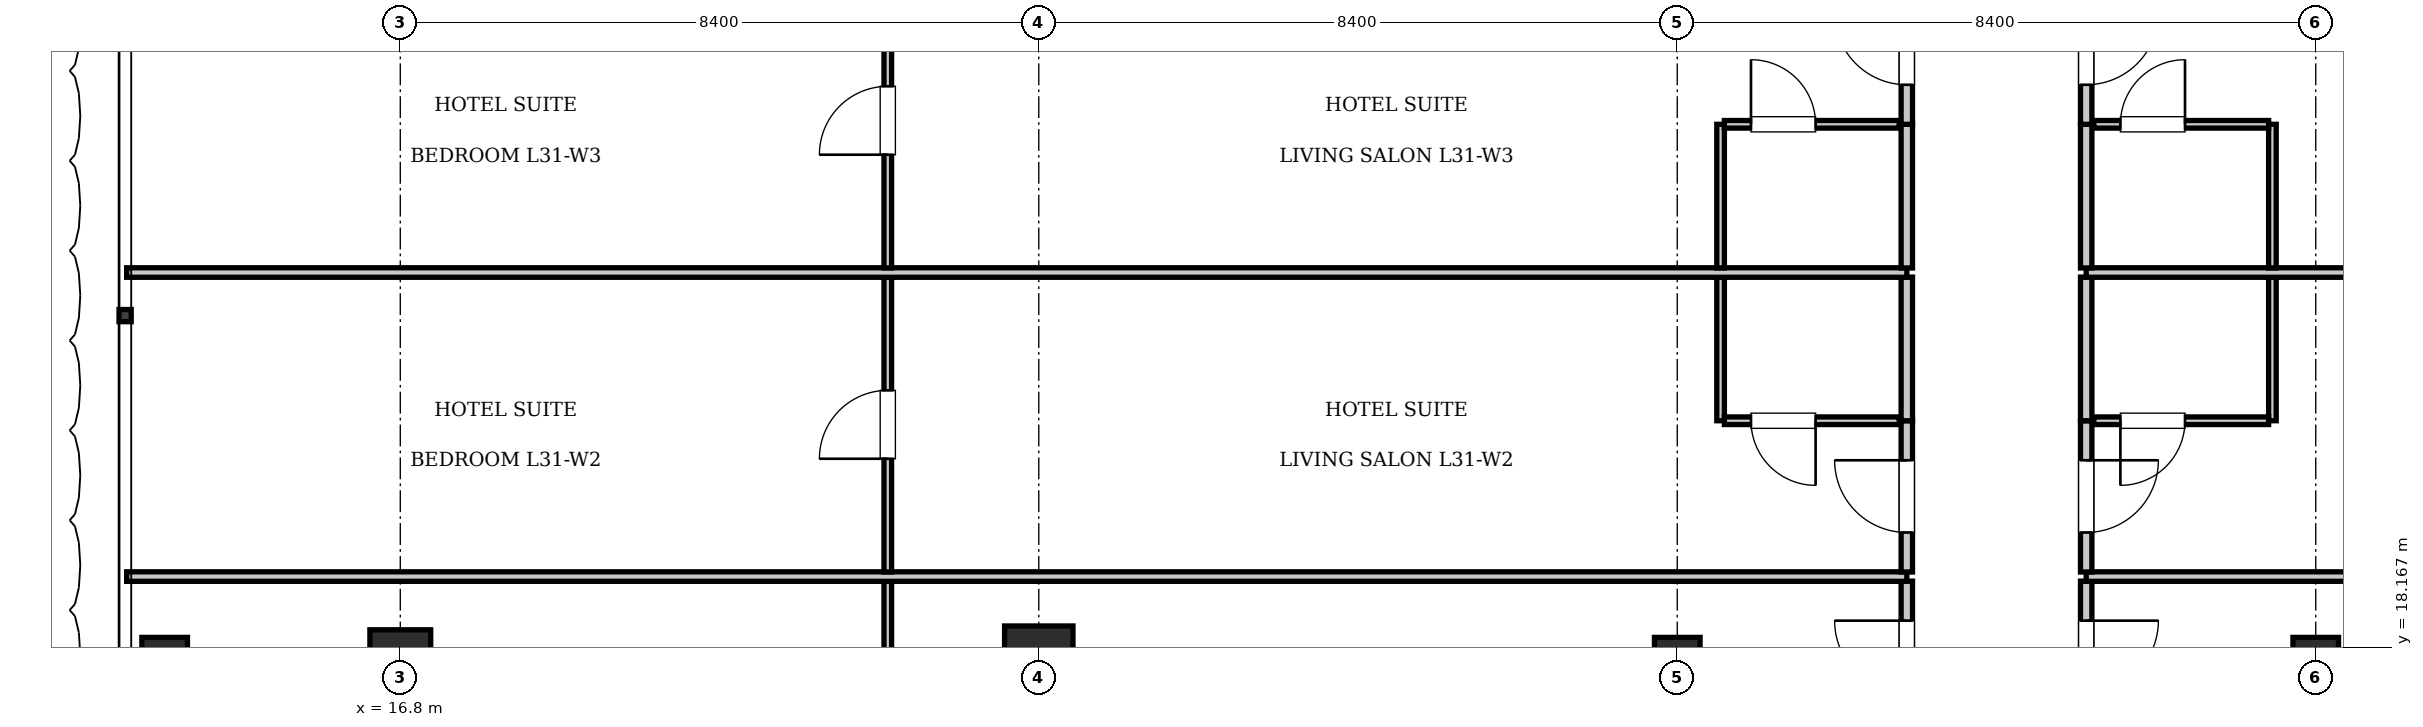
"""IFC4 building model, lengths in metres.
Left out: names, types, materials, properties, quantities, classifications, styles, units other than length and angle.
Written with IfcOpenShell. Run it as: python <this file> out.ifc"""

import sys

from ifc_helpers import new_model, si_unit, direction, frame, frame_2d, origin, origin_2d, place, context, subcontext, project, spatial, rectangle, i_section, extrude, element, fill, save


model = new_model("IFC4")
c1 = context("Model", 3, precision=1e-05, world=origin(), true_north=direction((0.0, 1.0)))
c2 = subcontext(c1, "Body", "Model", "MODEL_VIEW")
j1 = project(units=[si_unit("LENGTHUNIT", "METRE"), si_unit("PLANEANGLEUNIT", "RADIAN")], contexts=[c1])
p1 = place(None, origin())
s1 = spatial("IfcSite", under=j1, at=p1, CompositionType="ELEMENT")
p2 = place(p1, origin())
s2 = spatial("IfcBuilding", under=s1, at=p2, CompositionType="ELEMENT")
p3 = place(p2, frame((0.0, 0.0, 131.25)))
s3 = spatial("IfcBuildingStorey", under=s2, at=p3, CompositionType="ELEMENT", Elevation=131.25)
p4 = place(p3, frame((25.2, 18.0, 0.0), z_axis=(0.0, 0.0, 1.0), x_axis=(1.0, 0.0, 0.0)))
e1 = element("IfcColumn", 1, at=p4, inside=s3, PredefinedType="COLUMN", context=c2, shape_type="SweptSolid", body=[
    extrude(rectangle(XDim=0.9, YDim=0.9, at=origin_2d()), origin(), (0.0, 0.0, 1.0), 3.85),
])
for number, where, z_axis, x_axis in (
    (2, (33.6, 18.0, 0.0), (0.0, 0.0, 1.0), (1.0, 0.0, 0.0)),
    (3, (42.0, 18.0, 0.0), (0.0, 0.0, 1.0), (1.0, 0.0, 0.0)),
):
    element("IfcColumn", number, at=place(p3, frame(where, z_axis=z_axis, x_axis=x_axis)), inside=s3, PredefinedType="COLUMN", context=c2, shape_type="SweptSolid", body=[
        extrude(i_section(OverallWidth=0.6, OverallDepth=0.6, WebThickness=0.025, FlangeThickness=0.038, at=origin_2d()), origin(), (0.0, 0.0, 1.0), 3.85),
    ])
p5 = place(p3, frame((16.8, 18.0, 0.0), z_axis=(0.0, 0.0, 1.0), x_axis=(1.0, 0.0, 0.0)))
e4 = element("IfcColumn", 4, at=p5, inside=s3, PredefinedType="COLUMN", context=c2, shape_type="SweptSolid", body=[
    extrude(rectangle(XDim=0.8, YDim=0.8, at=origin_2d()), origin(), (0.0, 0.0, 1.0), 3.85),
])
p6 = place(p3, frame((13.7, 18.0, 0.0), z_axis=(0.0, 0.0, 1.0), x_axis=(1.0, 0.0, 0.0)))
e5 = element("IfcColumn", 5, at=p6, inside=s3, PredefinedType="COLUMN", context=c2, shape_type="SweptSolid", body=[
    extrude(i_section(OverallWidth=0.6, OverallDepth=0.6, WebThickness=0.025, FlangeThickness=0.038, at=origin_2d()), origin(), (0.0, 0.0, 1.0), 3.85),
])
p7 = place(p3, frame((36.62, 17.05, 0.0), z_axis=(0.0, 0.0, 1.0), x_axis=(0.0, 1.0, 0.0)))
e6 = element("IfcWall", 6, at=p7, inside=s3, PredefinedType="PARTITIONING", context=c2, shape_type="SweptSolid", body=[
    extrude(rectangle(XDim=1.99, YDim=0.15, at=frame_2d((0.995, 0.0))), origin(), (0.0, 0.0, 1.0), 3.61),
])
p8 = place(p7, frame((0.52, 0.0, 0.0)))
e7 = element("IfcOpeningElement", 7, at=p8, cuts=e6, PredefinedType="OPENING", context=c2, shape_type="SweptSolid", body=[
    extrude(rectangle(XDim=0.95, YDim=2.15, at=frame_2d((0.475, 1.075))), frame((0.0, 0.085, 0.0), z_axis=(0.0, -1.0, 0.0), x_axis=(1.0, 0.0, 0.0)), (0.0, 0.0, 1.0), 0.17),
])
p9 = place(p3, frame((23.214, 15.16, 0.0), z_axis=(0.0, 0.0, 1.0), x_axis=(0.0, 1.0, 0.0)))
e8 = element("IfcWall", 8, at=p9, inside=s3, PredefinedType="PARTITIONING", context=c2, shape_type="SweptSolid", body=[
    extrude(rectangle(XDim=3.88, YDim=0.1, at=frame_2d((1.94, 0.0))), origin(), (0.0, 0.0, 1.0), 3.61),
])
p10 = place(p9, frame((1.49, 0.0, 0.0)))
e9 = element("IfcOpeningElement", 9, at=p10, cuts=e8, PredefinedType="OPENING", context=c2, shape_type="SweptSolid", body=[
    extrude(rectangle(XDim=0.9, YDim=2.1, at=frame_2d((0.45, 1.05))), frame((0.0, 0.06, 0.0), z_axis=(0.0, -1.0, 0.0), x_axis=(1.0, 0.0, 0.0)), (0.0, 0.0, 1.0), 0.12),
])
p11 = place(p3, frame((38.98, 17.05, 0.0), z_axis=(0.0, 0.0, 1.0), x_axis=(0.0, 1.0, 0.0)))
e10 = element("IfcWall", 10, at=p11, inside=s3, PredefinedType="PARTITIONING", context=c2, shape_type="SweptSolid", body=[
    extrude(rectangle(XDim=1.99, YDim=0.15, at=frame_2d((0.995, 0.0))), origin(), (0.0, 0.0, 1.0), 3.61),
])
p12 = place(p11, frame((0.52, 0.0, 0.0)))
e11 = element("IfcOpeningElement", 11, at=p12, cuts=e10, PredefinedType="OPENING", context=c2, shape_type="SweptSolid", body=[
    extrude(rectangle(XDim=0.95, YDim=2.15, at=frame_2d((0.475, 1.075))), frame((0.0, 0.085, 0.0), z_axis=(0.0, -1.0, 0.0), x_axis=(1.0, 0.0, 0.0)), (0.0, 0.0, 1.0), 0.17),
])
p13 = place(p3, frame((13.2, 19.1, 0.0), z_axis=(0.0, 0.0, 1.0), x_axis=(1.0, 0.0, 0.0)))
e12 = element("IfcWall", 12, at=p13, inside=s3, PredefinedType="PARTITIONING", context=c2, shape_type="SweptSolid", body=[
    extrude(rectangle(XDim=23.42, YDim=0.125, at=frame_2d((11.71, 0.0))), origin(), (0.0, 0.0, 1.0), 3.61),
])
p14 = place(p3, frame((38.98, 19.1, 0.0), z_axis=(0.0, 0.0, 1.0), x_axis=(1.0, 0.0, 0.0)))
e13 = element("IfcWall", 13, at=p14, inside=s3, PredefinedType="PARTITIONING", context=c2, shape_type="SweptSolid", body=[
    extrude(rectangle(XDim=23.42, YDim=0.125, at=frame_2d((11.71, 0.0))), origin(), (0.0, 0.0, 1.0), 3.61),
])
p15 = place(p3, frame((36.62, 19.16, 0.0), z_axis=(0.0, 0.0, 1.0), x_axis=(0.0, 1.0, 0.0)))
e14 = element("IfcWall", 14, at=p15, inside=s3, PredefinedType="PARTITIONING", context=c2, shape_type="SweptSolid", body=[
    extrude(rectangle(XDim=1.99, YDim=0.15, at=frame_2d((0.995, 0.0))), origin(), (0.0, 0.0, 1.0), 3.61),
])
p16 = place(p15, frame((0.52, 0.0, 0.0)))
e15 = element("IfcOpeningElement", 15, at=p16, cuts=e14, PredefinedType="OPENING", context=c2, shape_type="SweptSolid", body=[
    extrude(rectangle(XDim=0.95, YDim=2.15, at=frame_2d((0.475, 1.075))), frame((0.0, 0.085, 0.0), z_axis=(0.0, -1.0, 0.0), x_axis=(1.0, 0.0, 0.0)), (0.0, 0.0, 1.0), 0.17),
])
p17 = place(p3, frame((36.62, 21.15, 0.0), z_axis=(0.0, 0.0, 1.0), x_axis=(0.0, 1.0, 0.0)))
e16 = element("IfcWall", 16, at=p17, inside=s3, PredefinedType="PARTITIONING", context=c2, shape_type="SweptSolid", body=[
    extrude(rectangle(XDim=1.89, YDim=0.15, at=frame_2d((0.945, 0.0))), origin(), (0.0, 0.0, 1.0), 3.61),
])
p18 = place(p3, frame((34.17, 21.15, 0.0), z_axis=(0.0, 0.0, 1.0), x_axis=(0.0, 1.0, 0.0)))
e17 = element("IfcWall", 17, at=p18, inside=s3, PredefinedType="PARTITIONING", context=c2, shape_type="SweptSolid", body=[
    extrude(rectangle(XDim=1.89, YDim=0.1, at=frame_2d((0.945, 0.0))), origin(), (0.0, 0.0, 1.0), 3.61),
])
p19 = place(p3, frame((34.22, 21.15, 0.0), z_axis=(0.0, 0.0, 1.0), x_axis=(1.0, 0.0, 0.0)))
e18 = element("IfcWall", 18, at=p19, inside=s3, PredefinedType="PARTITIONING", context=c2, shape_type="SweptSolid", body=[
    extrude(rectangle(XDim=2.3, YDim=0.1, at=frame_2d((1.15, 0.0))), origin(), (0.0, 0.0, 1.0), 3.61),
])
p20 = place(p19, frame((0.35, 0.0, 0.0)))
e19 = element("IfcOpeningElement", 19, at=p20, cuts=e18, PredefinedType="OPENING", context=c2, shape_type="SweptSolid", body=[
    extrude(rectangle(XDim=0.85, YDim=2.1, at=frame_2d((0.425, 1.05))), frame((0.0, 0.06, 0.0), z_axis=(0.0, -1.0, 0.0), x_axis=(1.0, 0.0, 0.0)), (0.0, 0.0, 1.0), 0.12),
])
p21 = place(p3, frame((23.214, 19.16, 0.0), z_axis=(0.0, 0.0, 1.0), x_axis=(0.0, 1.0, 0.0)))
e20 = element("IfcWall", 20, at=p21, inside=s3, PredefinedType="PARTITIONING", context=c2, shape_type="SweptSolid", body=[
    extrude(rectangle(XDim=3.88, YDim=0.1, at=frame_2d((1.94, 0.0))), origin(), (0.0, 0.0, 1.0), 3.61),
])
p22 = place(p21, frame((1.49, 0.0, 0.0)))
e21 = element("IfcOpeningElement", 21, at=p22, cuts=e20, PredefinedType="OPENING", context=c2, shape_type="SweptSolid", body=[
    extrude(rectangle(XDim=0.9, YDim=2.1, at=frame_2d((0.45, 1.05))), frame((0.0, 0.06, 0.0), z_axis=(0.0, -1.0, 0.0), x_axis=(1.0, 0.0, 0.0)), (0.0, 0.0, 1.0), 0.12),
])
p23 = place(p3, frame((38.98, 19.16, 0.0), z_axis=(0.0, 0.0, 1.0), x_axis=(0.0, 1.0, 0.0)))
e22 = element("IfcWall", 22, at=p23, inside=s3, PredefinedType="PARTITIONING", context=c2, shape_type="SweptSolid", body=[
    extrude(rectangle(XDim=1.99, YDim=0.15, at=frame_2d((0.995, 0.0))), origin(), (0.0, 0.0, 1.0), 3.61),
])
p24 = place(p23, frame((0.52, 0.0, 0.0)))
e23 = element("IfcOpeningElement", 23, at=p24, cuts=e22, PredefinedType="OPENING", context=c2, shape_type="SweptSolid", body=[
    extrude(rectangle(XDim=0.95, YDim=2.15, at=frame_2d((0.475, 1.075))), frame((0.0, 0.085, 0.0), z_axis=(0.0, -1.0, 0.0), x_axis=(1.0, 0.0, 0.0)), (0.0, 0.0, 1.0), 0.17),
])
p25 = place(p3, frame((38.98, 21.15, 0.0), z_axis=(0.0, 0.0, 1.0), x_axis=(0.0, 1.0, 0.0)))
e24 = element("IfcWall", 24, at=p25, inside=s3, PredefinedType="PARTITIONING", context=c2, shape_type="SweptSolid", body=[
    extrude(rectangle(XDim=1.89, YDim=0.15, at=frame_2d((0.945, 0.0))), origin(), (0.0, 0.0, 1.0), 3.61),
])
p26 = place(p3, frame((41.43, 21.15, 0.0), z_axis=(0.0, 0.0, 1.0), x_axis=(0.0, 1.0, 0.0)))
e25 = element("IfcWall", 25, at=p26, inside=s3, PredefinedType="PARTITIONING", context=c2, shape_type="SweptSolid", body=[
    extrude(rectangle(XDim=1.89, YDim=0.1, at=frame_2d((0.945, 0.0))), origin(), (0.0, 0.0, 1.0), 3.61),
])
p27 = place(p3, frame((39.08, 21.15, 0.0), z_axis=(0.0, 0.0, 1.0), x_axis=(1.0, 0.0, 0.0)))
e26 = element("IfcWall", 26, at=p27, inside=s3, PredefinedType="PARTITIONING", context=c2, shape_type="SweptSolid", body=[
    extrude(rectangle(XDim=2.3, YDim=0.1, at=frame_2d((1.15, 0.0))), origin(), (0.0, 0.0, 1.0), 3.61),
])
p28 = place(p27, frame((0.35, 0.0, 0.0)))
e27 = element("IfcOpeningElement", 27, at=p28, cuts=e26, PredefinedType="OPENING", context=c2, shape_type="SweptSolid", body=[
    extrude(rectangle(XDim=0.85, YDim=2.1, at=frame_2d((0.425, 1.05))), frame((0.0, 0.06, 0.0), z_axis=(0.0, -1.0, 0.0), x_axis=(1.0, 0.0, 0.0)), (0.0, 0.0, 1.0), 0.12),
])
p29 = place(p3, frame((13.2, 23.1, 0.0), z_axis=(0.0, 0.0, 1.0), x_axis=(1.0, 0.0, 0.0)))
e28 = element("IfcWall", 28, at=p29, inside=s3, PredefinedType="PARTITIONING", context=c2, shape_type="SweptSolid", body=[
    extrude(rectangle(XDim=23.42, YDim=0.125, at=frame_2d((11.71, 0.0))), origin(), (0.0, 0.0, 1.0), 3.61),
])
p30 = place(p3, frame((38.98, 23.1, 0.0), z_axis=(0.0, 0.0, 1.0), x_axis=(1.0, 0.0, 0.0)))
e29 = element("IfcWall", 29, at=p30, inside=s3, PredefinedType="PARTITIONING", context=c2, shape_type="SweptSolid", body=[
    extrude(rectangle(XDim=23.42, YDim=0.125, at=frame_2d((11.71, 0.0))), origin(), (0.0, 0.0, 1.0), 3.61),
])
p31 = place(p3, frame((36.62, 23.16, 0.0), z_axis=(0.0, 0.0, 1.0), x_axis=(0.0, 1.0, 0.0)))
e30 = element("IfcWall", 30, at=p31, inside=s3, PredefinedType="PARTITIONING", context=c2, shape_type="SweptSolid", body=[
    extrude(rectangle(XDim=1.89, YDim=0.15, at=frame_2d((0.945, 0.0))), origin(), (0.0, 0.0, 1.0), 3.61),
])
p32 = place(p3, frame((36.62, 25.05, 0.0), z_axis=(0.0, 0.0, 1.0), x_axis=(0.0, 1.0, 0.0)))
e31 = element("IfcWall", 31, at=p32, inside=s3, PredefinedType="PARTITIONING", context=c2, shape_type="SweptSolid", body=[
    extrude(rectangle(XDim=1.99, YDim=0.15, at=frame_2d((0.995, 0.0))), origin(), (0.0, 0.0, 1.0), 3.61),
])
p33 = place(p32, frame((0.52, 0.0, 0.0)))
e32 = element("IfcOpeningElement", 32, at=p33, cuts=e31, PredefinedType="OPENING", context=c2, shape_type="SweptSolid", body=[
    extrude(rectangle(XDim=0.95, YDim=2.15, at=frame_2d((0.475, 1.075))), frame((0.0, 0.085, 0.0), z_axis=(0.0, -1.0, 0.0), x_axis=(1.0, 0.0, 0.0)), (0.0, 0.0, 1.0), 0.17),
])
p34 = place(p3, frame((34.17, 23.16, 0.0), z_axis=(0.0, 0.0, 1.0), x_axis=(0.0, 1.0, 0.0)))
e33 = element("IfcWall", 33, at=p34, inside=s3, PredefinedType="PARTITIONING", context=c2, shape_type="SweptSolid", body=[
    extrude(rectangle(XDim=1.89, YDim=0.1, at=frame_2d((0.945, 0.0))), origin(), (0.0, 0.0, 1.0), 3.61),
])
p35 = place(p3, frame((34.22, 25.05, 0.0), z_axis=(0.0, 0.0, 1.0), x_axis=(1.0, 0.0, 0.0)))
e34 = element("IfcWall", 34, at=p35, inside=s3, PredefinedType="PARTITIONING", context=c2, shape_type="SweptSolid", body=[
    extrude(rectangle(XDim=2.3, YDim=0.1, at=frame_2d((1.15, 0.0))), origin(), (0.0, 0.0, 1.0), 3.61),
])
p36 = place(p35, frame((0.35, 0.0, 0.0)))
e35 = element("IfcOpeningElement", 35, at=p36, cuts=e34, PredefinedType="OPENING", context=c2, shape_type="SweptSolid", body=[
    extrude(rectangle(XDim=0.85, YDim=2.1, at=frame_2d((0.425, 1.05))), frame((0.0, 0.06, 0.0), z_axis=(0.0, -1.0, 0.0), x_axis=(1.0, 0.0, 0.0)), (0.0, 0.0, 1.0), 0.12),
])
p37 = place(p3, frame((23.214, 23.16, 0.0), z_axis=(0.0, 0.0, 1.0), x_axis=(0.0, 1.0, 0.0)))
e36 = element("IfcWall", 36, at=p37, inside=s3, PredefinedType="PARTITIONING", context=c2, shape_type="SweptSolid", body=[
    extrude(rectangle(XDim=3.88, YDim=0.1, at=frame_2d((1.94, 0.0))), origin(), (0.0, 0.0, 1.0), 3.61),
])
p38 = place(p37, frame((1.49, 0.0, 0.0)))
e37 = element("IfcOpeningElement", 37, at=p38, cuts=e36, PredefinedType="OPENING", context=c2, shape_type="SweptSolid", body=[
    extrude(rectangle(XDim=0.9, YDim=2.1, at=frame_2d((0.45, 1.05))), frame((0.0, 0.06, 0.0), z_axis=(0.0, -1.0, 0.0), x_axis=(1.0, 0.0, 0.0)), (0.0, 0.0, 1.0), 0.12),
])
p39 = place(p3, frame((38.98, 23.16, 0.0), z_axis=(0.0, 0.0, 1.0), x_axis=(0.0, 1.0, 0.0)))
e38 = element("IfcWall", 38, at=p39, inside=s3, PredefinedType="PARTITIONING", context=c2, shape_type="SweptSolid", body=[
    extrude(rectangle(XDim=1.89, YDim=0.15, at=frame_2d((0.945, 0.0))), origin(), (0.0, 0.0, 1.0), 3.61),
])
p40 = place(p3, frame((38.98, 25.05, 0.0), z_axis=(0.0, 0.0, 1.0), x_axis=(0.0, 1.0, 0.0)))
e39 = element("IfcWall", 39, at=p40, inside=s3, PredefinedType="PARTITIONING", context=c2, shape_type="SweptSolid", body=[
    extrude(rectangle(XDim=1.99, YDim=0.15, at=frame_2d((0.995, 0.0))), origin(), (0.0, 0.0, 1.0), 3.61),
])
p41 = place(p40, frame((0.52, 0.0, 0.0)))
e40 = element("IfcOpeningElement", 40, at=p41, cuts=e39, PredefinedType="OPENING", context=c2, shape_type="SweptSolid", body=[
    extrude(rectangle(XDim=0.95, YDim=2.15, at=frame_2d((0.475, 1.075))), frame((0.0, 0.085, 0.0), z_axis=(0.0, -1.0, 0.0), x_axis=(1.0, 0.0, 0.0)), (0.0, 0.0, 1.0), 0.17),
])
p42 = place(p3, frame((41.43, 23.16, 0.0), z_axis=(0.0, 0.0, 1.0), x_axis=(0.0, 1.0, 0.0)))
e41 = element("IfcWall", 41, at=p42, inside=s3, PredefinedType="PARTITIONING", context=c2, shape_type="SweptSolid", body=[
    extrude(rectangle(XDim=1.89, YDim=0.1, at=frame_2d((0.945, 0.0))), origin(), (0.0, 0.0, 1.0), 3.61),
])
p43 = place(p3, frame((39.08, 25.05, 0.0), z_axis=(0.0, 0.0, 1.0), x_axis=(1.0, 0.0, 0.0)))
e42 = element("IfcWall", 42, at=p43, inside=s3, PredefinedType="PARTITIONING", context=c2, shape_type="SweptSolid", body=[
    extrude(rectangle(XDim=2.3, YDim=0.1, at=frame_2d((1.15, 0.0))), origin(), (0.0, 0.0, 1.0), 3.61),
])
p44 = place(p43, frame((0.35, 0.0, 0.0)))
e43 = element("IfcOpeningElement", 43, at=p44, cuts=e42, PredefinedType="OPENING", context=c2, shape_type="SweptSolid", body=[
    extrude(rectangle(XDim=0.85, YDim=2.1, at=frame_2d((0.425, 1.05))), frame((0.0, 0.06, 0.0), z_axis=(0.0, -1.0, 0.0), x_axis=(1.0, 0.0, 0.0)), (0.0, 0.0, 1.0), 0.12),
])
p45 = place(p8, origin())
e44 = element("IfcDoor", 44, at=p45, inside=s3, OperationType="SINGLE_SWING_RIGHT", PredefinedType="DOOR", context=c2, shape_type="SweptSolid", body=[
    extrude(rectangle(XDim=0.95, YDim=2.15, at=frame_2d((0.475, 1.075))), frame((0.0, 0.025, 0.0), z_axis=(0.0, -1.0, 0.0), x_axis=(1.0, 0.0, 0.0)), (0.0, 0.0, 1.0), 0.05),
])
fill(e7, e44)
p46 = place(p12, frame((0.95, 0.0, 0.0), z_axis=(0.0, 0.0, 1.0), x_axis=(-1.0, 0.0, 0.0)))
e45 = element("IfcDoor", 45, at=p46, inside=s3, OperationType="SINGLE_SWING_LEFT", PredefinedType="DOOR", context=c2, shape_type="SweptSolid", body=[
    extrude(rectangle(XDim=0.95, YDim=2.15, at=frame_2d((0.475, 1.075))), frame((0.0, 0.025, 0.0), z_axis=(0.0, -1.0, 0.0), x_axis=(1.0, 0.0, 0.0)), (0.0, 0.0, 1.0), 0.05),
])
fill(e11, e45)
p47 = place(p20, frame((0.85, 0.0, 0.0), z_axis=(0.0, 0.0, 1.0), x_axis=(-1.0, 0.0, 0.0)))
e46 = element("IfcDoor", 46, at=p47, inside=s3, OperationType="SINGLE_SWING_LEFT", PredefinedType="DOOR", context=c2, shape_type="SweptSolid", body=[
    extrude(rectangle(XDim=0.85, YDim=2.1, at=frame_2d((0.425, 1.05))), frame((0.0, 0.025, 0.0), z_axis=(0.0, -1.0, 0.0), x_axis=(1.0, 0.0, 0.0)), (0.0, 0.0, 1.0), 0.05),
])
fill(e19, e46)
p48 = place(p16, origin())
e47 = element("IfcDoor", 47, at=p48, inside=s3, OperationType="SINGLE_SWING_RIGHT", PredefinedType="DOOR", context=c2, shape_type="SweptSolid", body=[
    extrude(rectangle(XDim=0.95, YDim=2.15, at=frame_2d((0.475, 1.075))), frame((0.0, 0.025, 0.0), z_axis=(0.0, -1.0, 0.0), x_axis=(1.0, 0.0, 0.0)), (0.0, 0.0, 1.0), 0.05),
])
fill(e15, e47)
p49 = place(p22, origin())
e48 = element("IfcDoor", 48, at=p49, inside=s3, OperationType="SINGLE_SWING_LEFT", PredefinedType="DOOR", context=c2, shape_type="SweptSolid", body=[
    extrude(rectangle(XDim=0.9, YDim=2.1, at=frame_2d((0.45, 1.05))), frame((0.0, 0.025, 0.0), z_axis=(0.0, -1.0, 0.0), x_axis=(1.0, 0.0, 0.0)), (0.0, 0.0, 1.0), 0.05),
])
fill(e21, e48)
p50 = place(p28, frame((0.85, 0.0, 0.0), z_axis=(0.0, 0.0, 1.0), x_axis=(-1.0, 0.0, 0.0)))
e49 = element("IfcDoor", 49, at=p50, inside=s3, OperationType="SINGLE_SWING_RIGHT", PredefinedType="DOOR", context=c2, shape_type="SweptSolid", body=[
    extrude(rectangle(XDim=0.85, YDim=2.1, at=frame_2d((0.425, 1.05))), frame((0.0, 0.025, 0.0), z_axis=(0.0, -1.0, 0.0), x_axis=(1.0, 0.0, 0.0)), (0.0, 0.0, 1.0), 0.05),
])
fill(e27, e49)
p51 = place(p24, frame((0.95, 0.0, 0.0), z_axis=(0.0, 0.0, 1.0), x_axis=(-1.0, 0.0, 0.0)))
e50 = element("IfcDoor", 50, at=p51, inside=s3, OperationType="SINGLE_SWING_LEFT", PredefinedType="DOOR", context=c2, shape_type="SweptSolid", body=[
    extrude(rectangle(XDim=0.95, YDim=2.15, at=frame_2d((0.475, 1.075))), frame((0.0, 0.025, 0.0), z_axis=(0.0, -1.0, 0.0), x_axis=(1.0, 0.0, 0.0)), (0.0, 0.0, 1.0), 0.05),
])
fill(e23, e50)
p52 = place(p36, origin())
e51 = element("IfcDoor", 51, at=p52, inside=s3, OperationType="SINGLE_SWING_LEFT", PredefinedType="DOOR", context=c2, shape_type="SweptSolid", body=[
    extrude(rectangle(XDim=0.85, YDim=2.1, at=frame_2d((0.425, 1.05))), frame((0.0, 0.025, 0.0), z_axis=(0.0, -1.0, 0.0), x_axis=(1.0, 0.0, 0.0)), (0.0, 0.0, 1.0), 0.05),
])
fill(e35, e51)
p53 = place(p33, origin())
e52 = element("IfcDoor", 52, at=p53, inside=s3, OperationType="SINGLE_SWING_RIGHT", PredefinedType="DOOR", context=c2, shape_type="SweptSolid", body=[
    extrude(rectangle(XDim=0.95, YDim=2.15, at=frame_2d((0.475, 1.075))), frame((0.0, 0.025, 0.0), z_axis=(0.0, -1.0, 0.0), x_axis=(1.0, 0.0, 0.0)), (0.0, 0.0, 1.0), 0.05),
])
fill(e32, e52)
p54 = place(p38, origin())
e53 = element("IfcDoor", 53, at=p54, inside=s3, OperationType="SINGLE_SWING_LEFT", PredefinedType="DOOR", context=c2, shape_type="SweptSolid", body=[
    extrude(rectangle(XDim=0.9, YDim=2.1, at=frame_2d((0.45, 1.05))), frame((0.0, 0.025, 0.0), z_axis=(0.0, -1.0, 0.0), x_axis=(1.0, 0.0, 0.0)), (0.0, 0.0, 1.0), 0.05),
])
fill(e37, e53)
p55 = place(p44, origin())
e54 = element("IfcDoor", 54, at=p55, inside=s3, OperationType="SINGLE_SWING_RIGHT", PredefinedType="DOOR", context=c2, shape_type="SweptSolid", body=[
    extrude(rectangle(XDim=0.85, YDim=2.1, at=frame_2d((0.425, 1.05))), frame((0.0, 0.025, 0.0), z_axis=(0.0, -1.0, 0.0), x_axis=(1.0, 0.0, 0.0)), (0.0, 0.0, 1.0), 0.05),
])
fill(e43, e54)
p56 = place(p41, frame((0.95, 0.0, 0.0), z_axis=(0.0, 0.0, 1.0), x_axis=(-1.0, 0.0, 0.0)))
e55 = element("IfcDoor", 55, at=p56, inside=s3, OperationType="SINGLE_SWING_LEFT", PredefinedType="DOOR", context=c2, shape_type="SweptSolid", body=[
    extrude(rectangle(XDim=0.95, YDim=2.15, at=frame_2d((0.475, 1.075))), frame((0.0, 0.025, 0.0), z_axis=(0.0, -1.0, 0.0), x_axis=(1.0, 0.0, 0.0)), (0.0, 0.0, 1.0), 0.05),
])
fill(e40, e55)
save(model, sys.argv[1])
